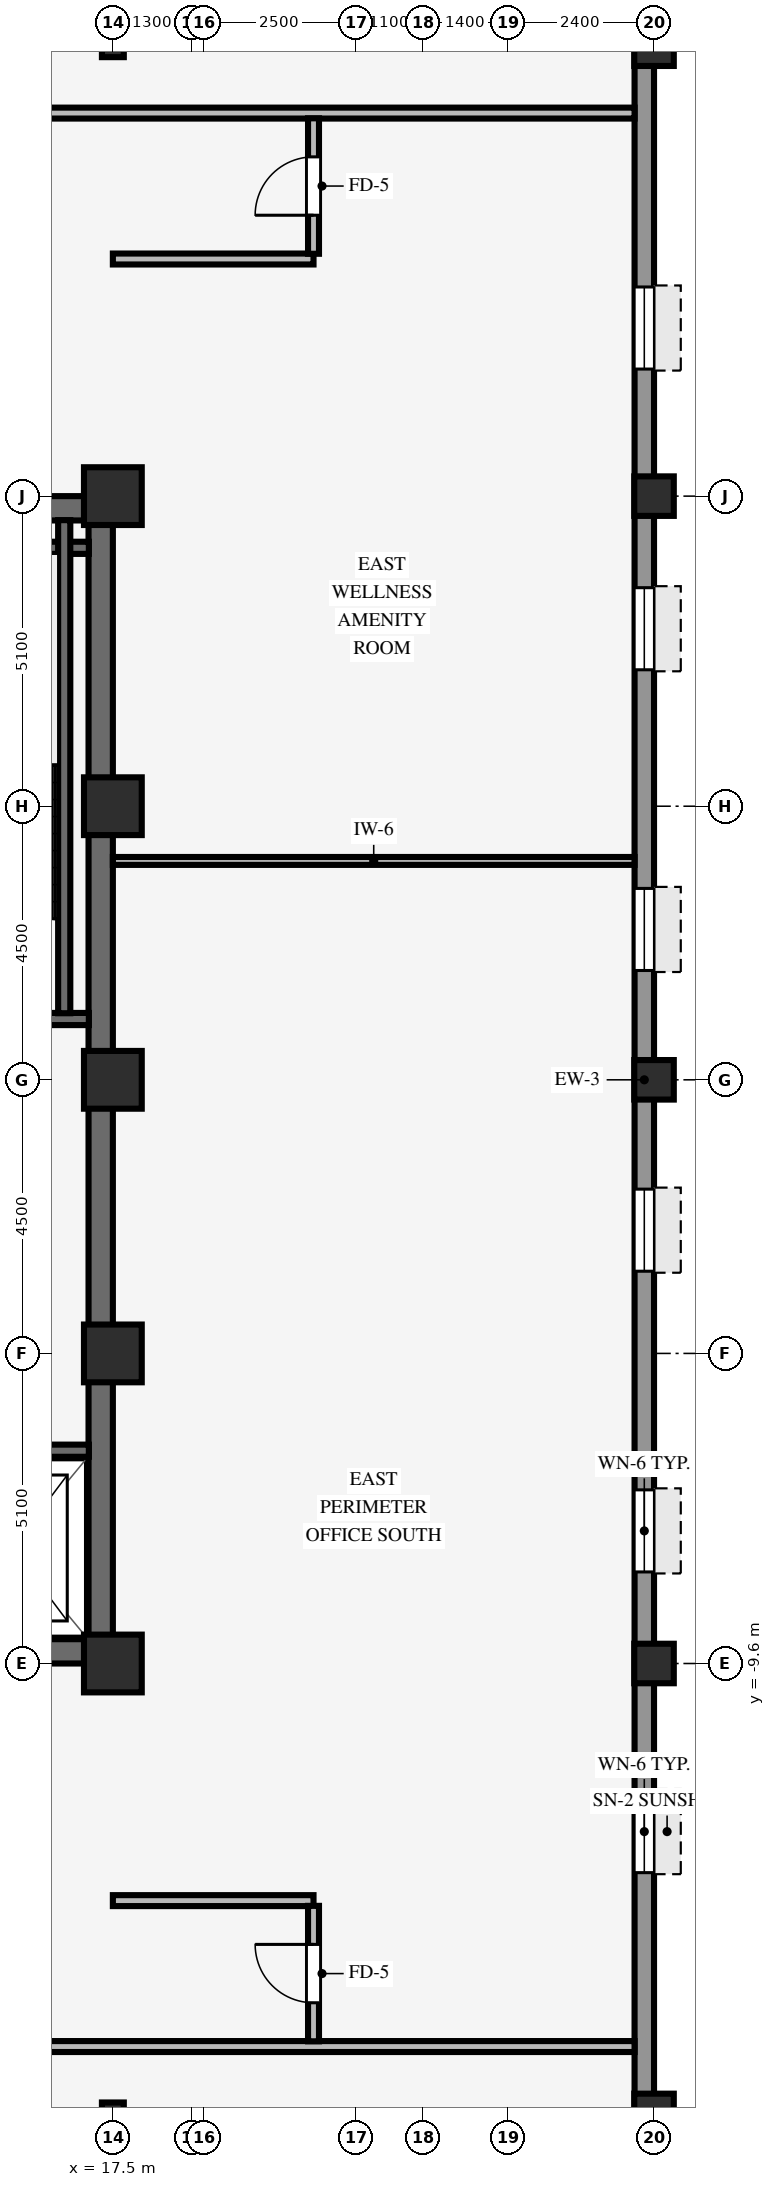
"""IFC4 building model, lengths in metres.
Left out: names, types, materials, properties, quantities, classifications, styles, units other than length and angle.
Written with IfcOpenShell. Run it as: python <this file> out.ifc"""

import sys

from ifc_helpers import new_model, si_unit, direction, frame, frame_2d, origin, origin_2d, place, context, subcontext, project, spatial, rectangle, hollow_rectangle, i_section, extrude, source, transform, mapped, element, fill, save


model = new_model("IFC4")
c1 = context("Model", 3, precision=1e-05, world=origin(), true_north=direction((0.0, 1.0)))
c2 = subcontext(c1, "Body", "Model", "MODEL_VIEW")
j1 = project(units=[si_unit("LENGTHUNIT", "METRE"), si_unit("PLANEANGLEUNIT", "RADIAN")], contexts=[c1])
p1 = place(None, origin())
s1 = spatial("IfcSite", under=j1, at=p1, CompositionType="ELEMENT")
p2 = place(p1, origin())
s2 = spatial("IfcBuilding", under=s1, at=p2, CompositionType="ELEMENT")
p3 = place(p2, frame((0.0, 0.0, 142.1)))
s3 = spatial("IfcBuildingStorey", under=s2, at=p3, CompositionType="ELEMENT", Elevation=142.1)
for number, where, z_axis, x_axis in (
    (1, (9.0, -9.4, 0.0), (0.0, 0.0, 1.0), (1.0, 0.0, 0.0)),
    (2, (9.0, 9.4, 0.0), (0.0, 0.0, 1.0), (1.0, 0.0, 0.0)),
):
    element("IfcWall", number, at=place(p3, frame(where, z_axis=z_axis, x_axis=x_axis)), inside=s3, PredefinedType="SHEAR", context=c2, shape_type="SweptSolid", body=[
        extrude(rectangle(XDim=8.5, YDim=0.4, at=frame_2d((4.25, 0.0))), origin(), (0.0, 0.0, 1.0), 3.37),
    ])
p4 = place(p3, frame((17.3, -9.205, 0.0), z_axis=(0.0, 0.0, 1.0), x_axis=(0.0, 1.0, 0.0)))
e3 = element("IfcWall", 3, at=p4, inside=s3, PredefinedType="SHEAR", context=c2, shape_type="SweptSolid", body=[
    extrude(rectangle(XDim=18.41, YDim=0.4, at=frame_2d((9.205, 0.0))), origin(), (0.0, 0.0, 1.0), 3.37),
])
for number, where, z_axis, x_axis in (
    (4, (17.5, -9.6, 0.0), (0.0, 0.0, 1.0), (1.0, 0.0, 0.0)),
    (5, (17.5, -4.5, 0.0), (0.0, 0.0, 1.0), (1.0, 0.0, 0.0)),
    (6, (17.5, 4.5, 0.0), (0.0, 0.0, 1.0), (1.0, 0.0, 0.0)),
    (7, (17.5, 9.6, 0.0), (0.0, 0.0, 1.0), (1.0, 0.0, 0.0)),
    (8, (17.5, 0.0, 0.0), (0.0, 0.0, 1.0), (1.0, 0.0, 0.0)),
):
    element("IfcColumn", number, at=place(p3, frame(where, z_axis=z_axis, x_axis=x_axis)), inside=s3, PredefinedType="COLUMN", context=c2, shape_type="SweptSolid", body=[
        extrude(rectangle(XDim=0.95, YDim=0.95, at=origin_2d()), origin(), (0.0, 0.0, 1.0), 3.37),
    ])
for number, where, z_axis, x_axis in (
    (9, (26.4, -17.0, 0.0), (0.0, 0.0, 1.0), (1.0, 0.0, 0.0)),
    (10, (26.4, -9.6, 0.0), (0.0, 0.0, 1.0), (1.0, 0.0, 0.0)),
    (11, (26.4, 0.0, 0.0), (0.0, 0.0, 1.0), (1.0, 0.0, 0.0)),
    (12, (26.4, 9.6, 0.0), (0.0, 0.0, 1.0), (1.0, 0.0, 0.0)),
    (13, (26.4, 17.0, 0.0), (0.0, 0.0, 1.0), (1.0, 0.0, 0.0)),
):
    element("IfcColumn", number, at=place(p3, frame(where, z_axis=z_axis, x_axis=x_axis)), inside=s3, PredefinedType="COLUMN", context=c2, shape_type="SweptSolid", body=[
        extrude(hollow_rectangle(XDim=0.65, YDim=0.65, WallThickness=0.04, InnerFilletRadius=0.04, OuterFilletRadius=0.08, at=origin_2d()), origin(), (0.0, 0.0, 1.0), 3.37),
    ])
for number, where, z_axis, x_axis in (
    (14, (17.5, -17.0, 0.0), (0.0, 0.0, 1.0), (1.0, 0.0, 0.0)),
    (15, (17.5, 17.0, 0.0), (0.0, 0.0, 1.0), (1.0, 0.0, 0.0)),
):
    element("IfcColumn", number, at=place(p3, frame(where, z_axis=z_axis, x_axis=x_axis)), inside=s3, PredefinedType="COLUMN", context=c2, shape_type="SweptSolid", body=[
        extrude(i_section(OverallWidth=0.36, OverallDepth=0.36, WebThickness=0.021, FlangeThickness=0.021, FilletRadius=0.018, at=origin_2d()), origin(), (0.0, 0.0, 1.0), 3.37),
    ])
p5 = place(p3, frame((26.24, -20.784, 0.0), z_axis=(0.0, 0.0, 1.0), x_axis=(0.0, 1.0, 0.0)))
e16 = element("IfcWall", 16, at=p5, inside=s3, PredefinedType="STANDARD", context=c2, shape_type="SweptSolid", body=[
    extrude(rectangle(XDim=41.568, YDim=0.32, at=frame_2d((20.784, 0.0))), origin(), (0.0, 0.0, 1.0), 2.705),
])
p6 = place(p5, frame((1.448, 0.0, 0.8)))
e17 = element("IfcOpeningElement", 17, at=p6, cuts=e16, PredefinedType="OPENING", context=c2, shape_type="SweptSolid", body=[
    extrude(rectangle(XDim=1.35, YDim=1.56, at=frame_2d((0.675, 0.78))), frame((0.0, 0.17, 0.0), z_axis=(0.0, -1.0, 0.0), x_axis=(1.0, 0.0, 0.0)), (0.0, 0.0, 1.0), 0.34),
])
p7 = place(p5, frame((7.744, 0.0, 0.8)))
e18 = element("IfcOpeningElement", 18, at=p7, cuts=e16, PredefinedType="OPENING", context=c2, shape_type="SweptSolid", body=[
    extrude(rectangle(XDim=1.35, YDim=1.56, at=frame_2d((0.675, 0.78))), frame((0.0, 0.17, 0.0), z_axis=(0.0, -1.0, 0.0), x_axis=(1.0, 0.0, 0.0)), (0.0, 0.0, 1.0), 0.34),
])
p8 = place(p5, frame((12.69, 0.0, 0.8)))
e19 = element("IfcOpeningElement", 19, at=p8, cuts=e16, PredefinedType="OPENING", context=c2, shape_type="SweptSolid", body=[
    extrude(rectangle(XDim=1.35, YDim=1.56, at=frame_2d((0.675, 0.78))), frame((0.0, 0.17, 0.0), z_axis=(0.0, -1.0, 0.0), x_axis=(1.0, 0.0, 0.0)), (0.0, 0.0, 1.0), 0.34),
])
p9 = place(p5, frame((17.636, 0.0, 0.8)))
e20 = element("IfcOpeningElement", 20, at=p9, cuts=e16, PredefinedType="OPENING", context=c2, shape_type="SweptSolid", body=[
    extrude(rectangle(XDim=1.35, YDim=1.56, at=frame_2d((0.675, 0.78))), frame((0.0, 0.17, 0.0), z_axis=(0.0, -1.0, 0.0), x_axis=(1.0, 0.0, 0.0)), (0.0, 0.0, 1.0), 0.34),
])
p10 = place(p5, frame((22.582, 0.0, 0.8)))
e21 = element("IfcOpeningElement", 21, at=p10, cuts=e16, PredefinedType="OPENING", context=c2, shape_type="SweptSolid", body=[
    extrude(rectangle(XDim=1.35, YDim=1.56, at=frame_2d((0.675, 0.78))), frame((0.0, 0.17, 0.0), z_axis=(0.0, -1.0, 0.0), x_axis=(1.0, 0.0, 0.0)), (0.0, 0.0, 1.0), 0.34),
])
p11 = place(p5, frame((27.528, 0.0, 0.8)))
e22 = element("IfcOpeningElement", 22, at=p11, cuts=e16, PredefinedType="OPENING", context=c2, shape_type="SweptSolid", body=[
    extrude(rectangle(XDim=1.35, YDim=1.56, at=frame_2d((0.675, 0.78))), frame((0.0, 0.17, 0.0), z_axis=(0.0, -1.0, 0.0), x_axis=(1.0, 0.0, 0.0)), (0.0, 0.0, 1.0), 0.34),
])
p12 = place(p5, frame((32.474, 0.0, 0.8)))
e23 = element("IfcOpeningElement", 23, at=p12, cuts=e16, PredefinedType="OPENING", context=c2, shape_type="SweptSolid", body=[
    extrude(rectangle(XDim=1.35, YDim=1.56, at=frame_2d((0.675, 0.78))), frame((0.0, 0.17, 0.0), z_axis=(0.0, -1.0, 0.0), x_axis=(1.0, 0.0, 0.0)), (0.0, 0.0, 1.0), 0.34),
])
p13 = place(p5, frame((38.77, 0.0, 0.8)))
e24 = element("IfcOpeningElement", 24, at=p13, cuts=e16, PredefinedType="OPENING", context=c2, shape_type="SweptSolid", body=[
    extrude(rectangle(XDim=1.35, YDim=1.56, at=frame_2d((0.675, 0.78))), frame((0.0, 0.17, 0.0), z_axis=(0.0, -1.0, 0.0), x_axis=(1.0, 0.0, 0.0)), (0.0, 0.0, 1.0), 0.34),
])
for number, where, z_axis, x_axis in (
    (25, (13.535, 1.0, 0.0), (0.0, 0.0, 1.0), (1.0, 0.0, 0.0)),
    (26, (13.535, 8.75, 0.0), (0.0, 0.0, 1.0), (1.0, 0.0, 0.0)),
):
    element("IfcWall", number, at=place(p3, frame(where, z_axis=z_axis, x_axis=x_axis)), inside=s3, PredefinedType="SHEAR", context=c2, shape_type="SweptSolid", body=[
        extrude(rectangle(XDim=3.57, YDim=0.2, at=frame_2d((1.785, 0.0))), origin(), (0.0, 0.0, 1.0), 3.37),
    ])
p14 = place(p3, frame((16.7, 1.095, 0.0), z_axis=(0.0, 0.0, 1.0), x_axis=(0.0, 1.0, 0.0)))
e27 = element("IfcWall", 27, at=p14, inside=s3, PredefinedType="SHEAR", context=c2, shape_type="SweptSolid", body=[
    extrude(rectangle(XDim=8.11, YDim=0.2, at=frame_2d((4.055, 0.0))), origin(), (0.0, 0.0, 1.0), 3.37),
])
p15 = place(p3, frame((14.645, -6.1, 0.0), z_axis=(0.0, 0.0, 1.0), x_axis=(1.0, 0.0, 0.0)))
e28 = element("IfcWall", 28, at=p15, inside=s3, PredefinedType="SHEAR", context=c2, shape_type="SweptSolid", body=[
    extrude(rectangle(XDim=2.46, YDim=0.2, at=frame_2d((1.23, 0.0))), origin(), (0.0, 0.0, 1.0), 3.37),
])
p16 = place(p3, frame((-26.08, -15.9, 0.0), z_axis=(0.0, 0.0, 1.0), x_axis=(1.0, 0.0, 0.0)))
e29 = element("IfcWall", 29, at=p16, inside=s3, PredefinedType="PARTITIONING", context=c2, shape_type="SweptSolid", body=[
    extrude(rectangle(XDim=52.16, YDim=0.18, at=frame_2d((26.08, 0.0))), origin(), (0.0, 0.0, 1.0), 3.36),
])
p17 = place(p16, frame((18.3, 0.0, 0.0)))
e30 = element("IfcOpeningElement", 30, at=p17, cuts=e29, PredefinedType="OPENING", context=c2, shape_type="SweptSolid", body=[
    extrude(rectangle(XDim=0.96, YDim=2.1, at=frame_2d((0.48, 1.05))), frame((0.0, 0.1, 0.0), z_axis=(0.0, -1.0, 0.0), x_axis=(1.0, 0.0, 0.0)), (0.0, 0.0, 1.0), 0.2),
])
p18 = place(p16, frame((40.5, 0.0, 0.0)))
e31 = element("IfcOpeningElement", 31, at=p18, cuts=e29, PredefinedType="OPENING", context=c2, shape_type="SweptSolid", body=[
    extrude(rectangle(XDim=0.96, YDim=2.1, at=frame_2d((0.48, 1.05))), frame((0.0, 0.1, 0.0), z_axis=(0.0, -1.0, 0.0), x_axis=(1.0, 0.0, 0.0)), (0.0, 0.0, 1.0), 0.2),
])
p19 = place(p3, frame((17.5, -13.5, 0.0), z_axis=(0.0, 0.0, 1.0), x_axis=(1.0, 0.0, 0.0)))
e32 = element("IfcWall", 32, at=p19, inside=s3, PredefinedType="PARTITIONING", context=c2, shape_type="SweptSolid", body=[
    extrude(rectangle(XDim=3.3, YDim=0.18, at=frame_2d((1.65, 0.0))), origin(), (0.0, 0.0, 1.0), 2.998),
])
p20 = place(p3, frame((17.5, 3.6, 0.0), z_axis=(0.0, 0.0, 1.0), x_axis=(1.0, 0.0, 0.0)))
e33 = element("IfcWall", 33, at=p20, inside=s3, PredefinedType="PARTITIONING", context=c2, shape_type="SweptSolid", body=[
    extrude(rectangle(XDim=8.58, YDim=0.13, at=frame_2d((4.29, 0.0))), origin(), (0.0, 0.0, 1.0), 3.36),
])
p21 = place(p3, frame((17.5, 13.5, 0.0), z_axis=(0.0, 0.0, 1.0), x_axis=(1.0, 0.0, 0.0)))
e34 = element("IfcWall", 34, at=p21, inside=s3, PredefinedType="PARTITIONING", context=c2, shape_type="SweptSolid", body=[
    extrude(rectangle(XDim=3.3, YDim=0.18, at=frame_2d((1.65, 0.0))), origin(), (0.0, 0.0, 1.0), 2.998),
])
p22 = place(p3, frame((-26.08, 15.9, 0.0), z_axis=(0.0, 0.0, 1.0), x_axis=(1.0, 0.0, 0.0)))
e35 = element("IfcWall", 35, at=p22, inside=s3, PredefinedType="PARTITIONING", context=c2, shape_type="SweptSolid", body=[
    extrude(rectangle(XDim=52.16, YDim=0.18, at=frame_2d((26.08, 0.0))), origin(), (0.0, 0.0, 1.0), 3.36),
])
p23 = place(p22, frame((15.55, 0.0, 0.0)))
e36 = element("IfcOpeningElement", 36, at=p23, cuts=e35, PredefinedType="OPENING", context=c2, shape_type="SweptSolid", body=[
    extrude(rectangle(XDim=0.96, YDim=2.1, at=frame_2d((0.48, 1.05))), frame((0.0, 0.1, 0.0), z_axis=(0.0, -1.0, 0.0), x_axis=(1.0, 0.0, 0.0)), (0.0, 0.0, 1.0), 0.2),
])
p24 = place(p22, frame((40.5, 0.0, 0.0)))
e37 = element("IfcOpeningElement", 37, at=p24, cuts=e35, PredefinedType="OPENING", context=c2, shape_type="SweptSolid", body=[
    extrude(rectangle(XDim=0.96, YDim=2.1, at=frame_2d((0.48, 1.05))), frame((0.0, 0.1, 0.0), z_axis=(0.0, -1.0, 0.0), x_axis=(1.0, 0.0, 0.0)), (0.0, 0.0, 1.0), 0.2),
])
p25 = place(p22, frame((6.65, 0.0, 0.0)))
e38 = element("IfcOpeningElement", 38, at=p25, cuts=e35, PredefinedType="OPENING", context=c2, shape_type="SweptSolid", body=[
    extrude(rectangle(XDim=0.96, YDim=2.1, at=frame_2d((0.48, 1.05))), frame((0.0, 0.1, 0.0), z_axis=(0.0, -1.0, 0.0), x_axis=(1.0, 0.0, 0.0)), (0.0, 0.0, 1.0), 0.2),
])
p26 = place(p3, frame((20.8, -15.814, 0.0), z_axis=(0.0, 0.0, 1.0), x_axis=(0.0, 1.0, 0.0)))
e39 = element("IfcWall", 39, at=p26, inside=s3, PredefinedType="PARTITIONING", context=c2, shape_type="SweptSolid", body=[
    extrude(rectangle(XDim=2.228, YDim=0.18, at=frame_2d((1.114, 0.0))), origin(), (0.0, 0.0, 1.0), 3.36),
])
p27 = place(p26, frame((0.634, 0.0, 0.0)))
e40 = element("IfcOpeningElement", 40, at=p27, cuts=e39, PredefinedType="OPENING", context=c2, shape_type="SweptSolid", body=[
    extrude(rectangle(XDim=0.96, YDim=2.1, at=frame_2d((0.48, 1.05))), frame((0.0, 0.1, 0.0), z_axis=(0.0, -1.0, 0.0), x_axis=(1.0, 0.0, 0.0)), (0.0, 0.0, 1.0), 0.2),
])
p28 = place(p3, frame((20.8, 13.586, 0.0), z_axis=(0.0, 0.0, 1.0), x_axis=(0.0, 1.0, 0.0)))
e41 = element("IfcWall", 41, at=p28, inside=s3, PredefinedType="PARTITIONING", context=c2, shape_type="SweptSolid", body=[
    extrude(rectangle(XDim=2.228, YDim=0.18, at=frame_2d((1.114, 0.0))), origin(), (0.0, 0.0, 1.0), 3.36),
])
p29 = place(p28, frame((0.634, 0.0, 0.0)))
e42 = element("IfcOpeningElement", 42, at=p29, cuts=e41, PredefinedType="OPENING", context=c2, shape_type="SweptSolid", body=[
    extrude(rectangle(XDim=0.96, YDim=2.1, at=frame_2d((0.48, 1.05))), frame((0.0, 0.1, 0.0), z_axis=(0.0, -1.0, 0.0), x_axis=(1.0, 0.0, 0.0)), (0.0, 0.0, 1.0), 0.2),
])
m1 = source(origin(), c2, "Body", "SweptSolid", [
    extrude(rectangle(XDim=1.35, YDim=1.56, at=frame_2d((0.675, 0.78))), frame((0.0, 0.03, 0.0), z_axis=(0.0, -1.0, 0.0), x_axis=(1.0, 0.0, 0.0)), (0.0, 0.0, 1.0), 0.06),
])
p30 = place(p7, origin())
e43 = element("IfcWindow", 43, at=p30, inside=s3, PartitioningType="SINGLE_PANEL", PredefinedType="WINDOW", context=c2, shape_type="MappedRepresentation", body=[
    mapped(m1, transform((0.0, 0.0, 0.0), scale=1.0)),
])
fill(e18, e43)
p31 = place(p8, origin())
e44 = element("IfcWindow", 44, at=p31, inside=s3, PartitioningType="SINGLE_PANEL", PredefinedType="WINDOW", context=c2, shape_type="MappedRepresentation", body=[
    mapped(m1, transform((0.0, 0.0, 0.0), scale=1.0)),
])
fill(e19, e44)
p32 = place(p9, origin())
e45 = element("IfcWindow", 45, at=p32, inside=s3, PartitioningType="SINGLE_PANEL", PredefinedType="WINDOW", context=c2, shape_type="MappedRepresentation", body=[
    mapped(m1, transform((0.0, 0.0, 0.0), scale=1.0)),
])
fill(e20, e45)
p33 = place(p10, origin())
e46 = element("IfcWindow", 46, at=p33, inside=s3, PartitioningType="SINGLE_PANEL", PredefinedType="WINDOW", context=c2, shape_type="MappedRepresentation", body=[
    mapped(m1, transform((0.0, 0.0, 0.0), scale=1.0)),
])
fill(e21, e46)
p34 = place(p11, origin())
e47 = element("IfcWindow", 47, at=p34, inside=s3, PartitioningType="SINGLE_PANEL", PredefinedType="WINDOW", context=c2, shape_type="MappedRepresentation", body=[
    mapped(m1, transform((0.0, 0.0, 0.0), scale=1.0)),
])
fill(e22, e47)
p35 = place(p12, origin())
e48 = element("IfcWindow", 48, at=p35, inside=s3, PartitioningType="SINGLE_PANEL", PredefinedType="WINDOW", context=c2, shape_type="MappedRepresentation", body=[
    mapped(m1, transform((0.0, 0.0, 0.0), scale=1.0)),
])
fill(e23, e48)
m2 = source(origin(), c2, "Body", "SweptSolid", [
    extrude(rectangle(XDim=0.96, YDim=2.1, at=frame_2d((0.48, 1.05))), frame((0.0, 0.025, 0.0), z_axis=(0.0, -1.0, 0.0), x_axis=(1.0, 0.0, 0.0)), (0.0, 0.0, 1.0), 0.05),
])
p36 = place(p27, origin())
e49 = element("IfcDoor", 49, at=p36, inside=s3, OperationType="SINGLE_SWING_RIGHT", PredefinedType="DOOR", context=c2, shape_type="MappedRepresentation", body=[
    mapped(m2, transform((0.0, 0.0, 0.0), scale=1.0)),
])
fill(e40, e49)
p37 = place(p29, origin())
e50 = element("IfcDoor", 50, at=p37, inside=s3, OperationType="SINGLE_SWING_LEFT", PredefinedType="DOOR", context=c2, shape_type="MappedRepresentation", body=[
    mapped(m2, transform((0.0, 0.0, 0.0), scale=1.0)),
])
fill(e42, e50)
save(model, sys.argv[1])
